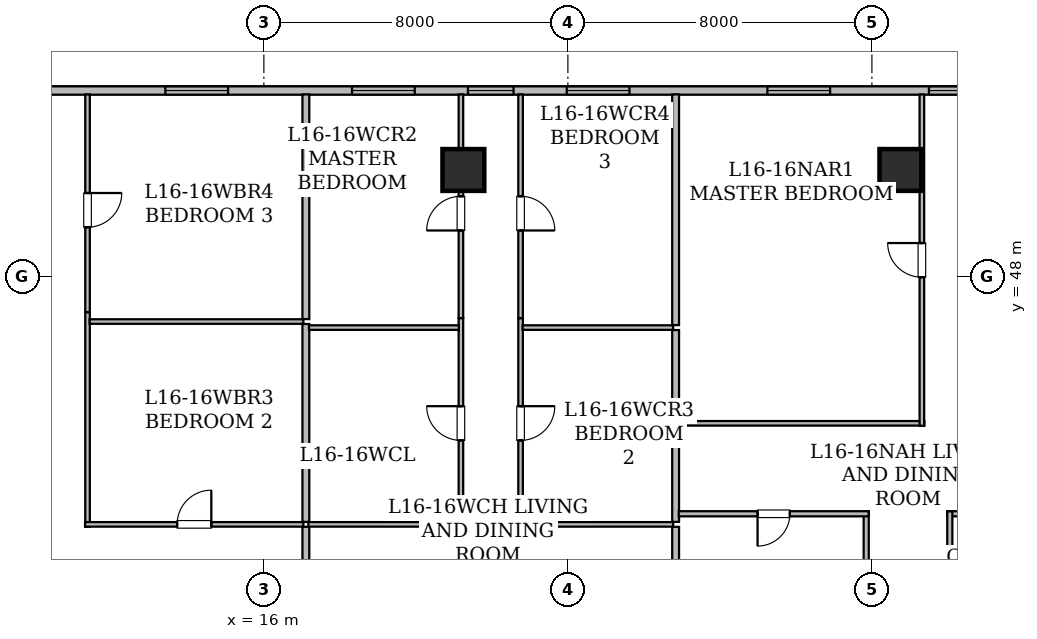
"""IFC4 building model, lengths in metres.
Left out: names, types, materials, properties, quantities, classifications, styles, units other than length and angle.
Written with IfcOpenShell. Run it as: python <this file> out.ifc"""

import sys

from ifc_helpers import new_model, si_unit, direction, frame, frame_2d, origin, origin_2d, place, context, subcontext, project, spatial, rectangle, hollow_rectangle, extrude, element, fill, save


model = new_model("IFC4")
c1 = context("Model", 3, precision=1e-05, world=origin(), true_north=direction((0.0, 1.0)))
c2 = subcontext(c1, "Body", "Model", "MODEL_VIEW")
j1 = project(units=[si_unit("LENGTHUNIT", "METRE"), si_unit("PLANEANGLEUNIT", "RADIAN")], contexts=[c1])
p1 = place(None, origin())
s1 = spatial("IfcSite", under=j1, at=p1, CompositionType="ELEMENT")
p2 = place(p1, origin())
s2 = spatial("IfcBuilding", under=s1, at=p2, CompositionType="ELEMENT")
p3 = place(p2, frame((0.0, 0.0, 66.15)))
s3 = spatial("IfcBuildingStorey", under=s2, at=p3, CompositionType="ELEMENT", Elevation=66.15)
for number, where, z_axis, x_axis in (
    (1, (21.25, 50.8, 0.0), (0.0, 0.0, 1.0), (1.0, 0.0, 0.0)),
    (2, (32.75, 50.8, 0.0), (0.0, 0.0, 1.0), (1.0, 0.0, 0.0)),
):
    element("IfcColumn", number, at=place(p3, frame(where, z_axis=z_axis, x_axis=x_axis)), inside=s3, PredefinedType="COLUMN", context=c2, shape_type="SweptSolid", body=[
        extrude(hollow_rectangle(XDim=1.1, YDim=1.1, WallThickness=0.055, at=origin_2d()), origin(), (0.0, 0.0, 1.0), 3.65),
    ])
p4 = place(p3, frame((8.315, 52.89, 0.0), z_axis=(0.0, 0.0, 1.0), x_axis=(1.0, 0.0, 0.0)))
e3 = element("IfcWall", 3, at=p4, inside=s3, PredefinedType="STANDARD", context=c2, shape_type="SweptSolid", body=[
    extrude(rectangle(XDim=37.439, YDim=0.22, at=frame_2d((18.719, 0.0))), origin(), (0.0, 0.0, 1.0), 3.43),
])
p5 = place(p4, frame((5.093, 0.0, 0.85)))
e4 = element("IfcOpeningElement", 4, at=p5, cuts=e3, PredefinedType="OPENING", context=c2, shape_type="SweptSolid", body=[
    extrude(rectangle(XDim=1.65, YDim=1.55, at=frame_2d((0.825, 0.775))), frame((0.0, 0.12, 0.0), z_axis=(0.0, -1.0, 0.0), x_axis=(1.0, 0.0, 0.0)), (0.0, 0.0, 1.0), 0.24),
])
p6 = place(p4, frame((13.055, 0.0, 0.8)))
e5 = element("IfcOpeningElement", 5, at=p6, cuts=e3, PredefinedType="OPENING", context=c2, shape_type="SweptSolid", body=[
    extrude(rectangle(XDim=1.2, YDim=1.5, at=frame_2d((0.6, 0.75))), frame((0.0, 0.12, 0.0), z_axis=(0.0, -1.0, 0.0), x_axis=(1.0, 0.0, 0.0)), (0.0, 0.0, 1.0), 0.24),
])
p7 = place(p4, frame((10.005, 0.0, 0.85)))
e6 = element("IfcOpeningElement", 6, at=p7, cuts=e3, PredefinedType="OPENING", context=c2, shape_type="SweptSolid", body=[
    extrude(rectangle(XDim=1.65, YDim=1.55, at=frame_2d((0.825, 0.775))), frame((0.0, 0.12, 0.0), z_axis=(0.0, -1.0, 0.0), x_axis=(1.0, 0.0, 0.0)), (0.0, 0.0, 1.0), 0.24),
])
p8 = place(p4, frame((15.655, 0.0, 0.85)))
e7 = element("IfcOpeningElement", 7, at=p8, cuts=e3, PredefinedType="OPENING", context=c2, shape_type="SweptSolid", body=[
    extrude(rectangle(XDim=1.65, YDim=1.55, at=frame_2d((0.825, 0.775))), frame((0.0, 0.12, 0.0), z_axis=(0.0, -1.0, 0.0), x_axis=(1.0, 0.0, 0.0)), (0.0, 0.0, 1.0), 0.24),
])
p9 = place(p4, frame((25.185, 0.0, 0.8)))
e8 = element("IfcOpeningElement", 8, at=p9, cuts=e3, PredefinedType="OPENING", context=c2, shape_type="SweptSolid", body=[
    extrude(rectangle(XDim=1.2, YDim=1.5, at=frame_2d((0.6, 0.75))), frame((0.0, 0.12, 0.0), z_axis=(0.0, -1.0, 0.0), x_axis=(1.0, 0.0, 0.0)), (0.0, 0.0, 1.0), 0.24),
])
p10 = place(p4, frame((20.935, 0.0, 0.85)))
e9 = element("IfcOpeningElement", 9, at=p10, cuts=e3, PredefinedType="OPENING", context=c2, shape_type="SweptSolid", body=[
    extrude(rectangle(XDim=1.65, YDim=1.55, at=frame_2d((0.825, 0.775))), frame((0.0, 0.12, 0.0), z_axis=(0.0, -1.0, 0.0), x_axis=(1.0, 0.0, 0.0)), (0.0, 0.0, 1.0), 0.24),
])
p11 = place(p4, frame((28.985, 0.0, 0.85)))
e10 = element("IfcOpeningElement", 10, at=p11, cuts=e3, PredefinedType="OPENING", context=c2, shape_type="SweptSolid", body=[
    extrude(rectangle(XDim=1.65, YDim=1.55, at=frame_2d((0.825, 0.775))), frame((0.0, 0.12, 0.0), z_axis=(0.0, -1.0, 0.0), x_axis=(1.0, 0.0, 0.0)), (0.0, 0.0, 1.0), 0.24),
])
p12 = place(p4, frame((33.49, 0.0, 0.85)))
e11 = element("IfcOpeningElement", 11, at=p12, cuts=e3, PredefinedType="OPENING", context=c2, shape_type="SweptSolid", body=[
    extrude(rectangle(XDim=1.65, YDim=1.55, at=frame_2d((0.825, 0.775))), frame((0.0, 0.12, 0.0), z_axis=(0.0, -1.0, 0.0), x_axis=(1.0, 0.0, 0.0)), (0.0, 0.0, 1.0), 0.24),
])
p13 = place(p4, frame((35.942, 0.0, 0.85)))
e12 = element("IfcOpeningElement", 12, at=p13, cuts=e3, PredefinedType="OPENING", context=c2, shape_type="SweptSolid", body=[
    extrude(rectangle(XDim=1.35, YDim=1.5, at=frame_2d((0.675, 0.75))), frame((0.0, 0.12, 0.0), z_axis=(0.0, -1.0, 0.0), x_axis=(1.0, 0.0, 0.0)), (0.0, 0.0, 1.0), 0.24),
])
p14 = place(p3, frame((11.36, 47.061, 0.0), z_axis=(0.0, 0.0, 1.0), x_axis=(0.0, -1.0, 0.0)))
e13 = element("IfcWall", 13, at=p14, inside=s3, PredefinedType="PARTITIONING", context=c2, shape_type="SweptSolid", body=[
    extrude(rectangle(XDim=5.651, YDim=0.12, at=frame_2d((2.826, 0.0))), origin(), (0.0, 0.0, 1.0), 3.065),
])
p15 = place(p3, frame((11.295, 41.475, 0.0), z_axis=(0.0, 0.0, 1.0), x_axis=(1.0, 0.0, 0.0)))
e14 = element("IfcWall", 14, at=p15, inside=s3, PredefinedType="PARTITIONING", context=c2, shape_type="SweptSolid", body=[
    extrude(rectangle(XDim=5.745, YDim=0.12, at=frame_2d((2.873, 0.0))), origin(), (0.0, 0.0, 1.0), 2.647),
])
p16 = place(p15, frame((2.422, 0.0, 0.0)))
e15 = element("IfcOpeningElement", 15, at=p16, cuts=e14, PredefinedType="OPENING", context=c2, shape_type="SweptSolid", body=[
    extrude(rectangle(XDim=0.9, YDim=2.1, at=frame_2d((0.45, 1.05))), frame((0.0, 0.07, 0.0), z_axis=(0.0, -1.0, 0.0), x_axis=(1.0, 0.0, 0.0)), (0.0, 0.0, 1.0), 0.14),
])
p17 = place(p3, frame((11.36, 52.788, 0.0), z_axis=(0.0, 0.0, 1.0), x_axis=(0.0, -1.0, 0.0)))
e16 = element("IfcWall", 16, at=p17, inside=s3, PredefinedType="PARTITIONING", context=c2, shape_type="SweptSolid", body=[
    extrude(rectangle(XDim=5.727, YDim=0.12, at=frame_2d((2.864, 0.0))), origin(), (0.0, 0.0, 1.0), 2.647),
])
p18 = place(p17, frame((2.594, 0.0, 0.0)))
e17 = element("IfcOpeningElement", 17, at=p18, cuts=e16, PredefinedType="OPENING", context=c2, shape_type="SweptSolid", body=[
    extrude(rectangle(XDim=0.9, YDim=2.1, at=frame_2d((0.45, 1.05))), frame((0.0, 0.07, 0.0), z_axis=(0.0, -1.0, 0.0), x_axis=(1.0, 0.0, 0.0)), (0.0, 0.0, 1.0), 0.14),
])
p19 = place(p3, frame((17.105, 41.41, 0.0), z_axis=(0.0, 0.0, 1.0), x_axis=(0.0, -1.0, 0.0)))
e18 = element("IfcWall", 18, at=p19, inside=s3, PredefinedType="STANDARD", context=c2, shape_type="SweptSolid", body=[
    extrude(rectangle(XDim=2.25, YDim=0.18, at=frame_2d((1.125, 0.0))), origin(), (0.0, 0.0, 1.0), 2.647),
])
p20 = place(p3, frame((11.414, 46.812, 0.0), z_axis=(0.0, 0.0, 1.0), x_axis=(1.0, 0.0, 0.0)))
e19 = element("IfcWall", 19, at=p20, inside=s3, PredefinedType="PARTITIONING", context=c2, shape_type="SweptSolid", body=[
    extrude(rectangle(XDim=5.626, YDim=0.12, at=frame_2d((2.813, 0.0))), origin(), (0.0, 0.0, 1.0), 2.647),
])
p21 = place(p3, frame((17.105, 46.747, 0.0), z_axis=(0.0, 0.0, 1.0), x_axis=(0.0, -1.0, 0.0)))
e20 = element("IfcWall", 20, at=p21, inside=s3, PredefinedType="STANDARD", context=c2, shape_type="SweptSolid", body=[
    extrude(rectangle(XDim=5.207, YDim=0.18, at=frame_2d((2.604, 0.0))), origin(), (0.0, 0.0, 1.0), 3.065),
])
p22 = place(p3, frame((17.105, 52.788, 0.0), z_axis=(0.0, 0.0, 1.0), x_axis=(0.0, -1.0, 0.0)))
e21 = element("IfcWall", 21, at=p22, inside=s3, PredefinedType="STANDARD", context=c2, shape_type="SweptSolid", body=[
    extrude(rectangle(XDim=5.911, YDim=0.18, at=frame_2d((2.956, 0.0))), origin(), (0.0, 0.0, 1.0), 2.803),
])
p23 = place(p3, frame((17.17, 41.475, 0.0), z_axis=(0.0, 0.0, 1.0), x_axis=(1.0, 0.0, 0.0)))
e22 = element("IfcWall", 22, at=p23, inside=s3, PredefinedType="PARTITIONING", context=c2, shape_type="SweptSolid", body=[
    extrude(rectangle(XDim=4.08, YDim=0.12, at=frame_2d((2.04, 0.0))), origin(), (0.0, 0.0, 1.0), 2.647),
])
p24 = place(p3, frame((21.185, 41.41, 0.0), z_axis=(0.0, 0.0, 1.0), x_axis=(0.0, 1.0, 0.0)))
e23 = element("IfcWall", 23, at=p24, inside=s3, PredefinedType="PARTITIONING", context=c2, shape_type="SweptSolid", body=[
    extrude(rectangle(XDim=5.492, YDim=0.12, at=frame_2d((2.746, 0.0))), origin(), (0.0, 0.0, 1.0), 3.065),
])
p25 = place(p24, frame((2.275, 0.0, 0.0)))
e24 = element("IfcOpeningElement", 24, at=p25, cuts=e23, PredefinedType="OPENING", context=c2, shape_type="SweptSolid", body=[
    extrude(rectangle(XDim=0.9, YDim=2.1, at=frame_2d((0.45, 1.05))), frame((0.0, 0.07, 0.0), z_axis=(0.0, -1.0, 0.0), x_axis=(1.0, 0.0, 0.0)), (0.0, 0.0, 1.0), 0.14),
])
p26 = place(p3, frame((21.185, 46.902, 0.0), z_axis=(0.0, 0.0, 1.0), x_axis=(0.0, 1.0, 0.0)))
e25 = element("IfcWall", 25, at=p26, inside=s3, PredefinedType="PARTITIONING", context=c2, shape_type="SweptSolid", body=[
    extrude(rectangle(XDim=5.886, YDim=0.12, at=frame_2d((2.943, 0.0))), origin(), (0.0, 0.0, 1.0), 2.647),
])
p27 = place(p26, frame((2.306, 0.0, 0.0)))
e26 = element("IfcOpeningElement", 26, at=p27, cuts=e25, PredefinedType="OPENING", context=c2, shape_type="SweptSolid", body=[
    extrude(rectangle(XDim=0.9, YDim=2.1, at=frame_2d((0.45, 1.05))), frame((0.0, 0.07, 0.0), z_axis=(0.0, -1.0, 0.0), x_axis=(1.0, 0.0, 0.0)), (0.0, 0.0, 1.0), 0.14),
])
p28 = place(p3, frame((22.755, 46.902, 0.0), z_axis=(0.0, 0.0, 1.0), x_axis=(0.0, -1.0, 0.0)))
e27 = element("IfcWall", 27, at=p28, inside=s3, PredefinedType="PARTITIONING", context=c2, shape_type="SweptSolid", body=[
    extrude(rectangle(XDim=5.492, YDim=0.12, at=frame_2d((2.746, 0.0))), origin(), (0.0, 0.0, 1.0), 3.065),
])
p29 = place(p28, frame((2.317, 0.0, 0.0)))
e28 = element("IfcOpeningElement", 28, at=p29, cuts=e27, PredefinedType="OPENING", context=c2, shape_type="SweptSolid", body=[
    extrude(rectangle(XDim=0.9, YDim=2.1, at=frame_2d((0.45, 1.05))), frame((0.0, 0.07, 0.0), z_axis=(0.0, -1.0, 0.0), x_axis=(1.0, 0.0, 0.0)), (0.0, 0.0, 1.0), 0.14),
])
p30 = place(p3, frame((22.69, 41.475, 0.0), z_axis=(0.0, 0.0, 1.0), x_axis=(1.0, 0.0, 0.0)))
e29 = element("IfcWall", 29, at=p30, inside=s3, PredefinedType="PARTITIONING", context=c2, shape_type="SweptSolid", body=[
    extrude(rectangle(XDim=4.08, YDim=0.12, at=frame_2d((2.04, 0.0))), origin(), (0.0, 0.0, 1.0), 3.43),
])
p31 = place(p3, frame((22.755, 52.788, 0.0), z_axis=(0.0, 0.0, 1.0), x_axis=(0.0, -1.0, 0.0)))
e30 = element("IfcWall", 30, at=p31, inside=s3, PredefinedType="PARTITIONING", context=c2, shape_type="SweptSolid", body=[
    extrude(rectangle(XDim=5.886, YDim=0.12, at=frame_2d((2.943, 0.0))), origin(), (0.0, 0.0, 1.0), 2.803),
])
p32 = place(p31, frame((2.68, 0.0, 0.0)))
e31 = element("IfcOpeningElement", 31, at=p32, cuts=e30, PredefinedType="OPENING", context=c2, shape_type="SweptSolid", body=[
    extrude(rectangle(XDim=0.9, YDim=2.1, at=frame_2d((0.45, 1.05))), frame((0.0, 0.07, 0.0), z_axis=(0.0, -1.0, 0.0), x_axis=(1.0, 0.0, 0.0)), (0.0, 0.0, 1.0), 0.14),
])
p33 = place(p3, frame((26.835, 41.41, 0.0), z_axis=(0.0, 0.0, 1.0), x_axis=(0.0, -1.0, 0.0)))
e32 = element("IfcWall", 32, at=p33, inside=s3, PredefinedType="STANDARD", context=c2, shape_type="SweptSolid", body=[
    extrude(rectangle(XDim=2.18, YDim=0.18, at=frame_2d((1.09, 0.0))), origin(), (0.0, 0.0, 1.0), 3.43),
])
p34 = place(p3, frame((17.187, 46.653, 0.0), z_axis=(0.0, 0.0, 1.0), x_axis=(1.0, 0.0, 0.0)))
e33 = element("IfcWall", 33, at=p34, inside=s3, PredefinedType="PARTITIONING", context=c2, shape_type="SweptSolid", body=[
    extrude(rectangle(XDim=3.944, YDim=0.12, at=frame_2d((1.972, 0.0))), origin(), (0.0, 0.0, 1.0), 2.647),
])
p35 = place(p3, frame((22.809, 46.653, 0.0), z_axis=(0.0, 0.0, 1.0), x_axis=(1.0, 0.0, 0.0)))
e34 = element("IfcWall", 34, at=p35, inside=s3, PredefinedType="PARTITIONING", context=c2, shape_type="SweptSolid", body=[
    extrude(rectangle(XDim=3.961, YDim=0.12, at=frame_2d((1.98, 0.0))), origin(), (0.0, 0.0, 1.0), 3.43),
])
p36 = place(p3, frame((26.835, 44.383, 0.0), z_axis=(0.0, 0.0, 1.0), x_axis=(0.0, -1.0, 0.0)))
e35 = element("IfcWall", 35, at=p36, inside=s3, PredefinedType="STANDARD", context=c2, shape_type="SweptSolid", body=[
    extrude(rectangle(XDim=2.843, YDim=0.18, at=frame_2d((1.421, 0.0))), origin(), (0.0, 0.0, 1.0), 3.065),
])
p37 = place(p3, frame((26.835, 46.588, 0.0), z_axis=(0.0, 0.0, 1.0), x_axis=(0.0, -1.0, 0.0)))
e36 = element("IfcWall", 36, at=p37, inside=s3, PredefinedType="STANDARD", context=c2, shape_type="SweptSolid", body=[
    extrude(rectangle(XDim=2.205, YDim=0.18, at=frame_2d((1.103, 0.0))), origin(), (0.0, 0.0, 1.0), 3.43),
])
p38 = place(p3, frame((26.835, 52.788, 0.0), z_axis=(0.0, 0.0, 1.0), x_axis=(0.0, -1.0, 0.0)))
e37 = element("IfcWall", 37, at=p38, inside=s3, PredefinedType="STANDARD", context=c2, shape_type="SweptSolid", body=[
    extrude(rectangle(XDim=6.07, YDim=0.18, at=frame_2d((3.035, 0.0))), origin(), (0.0, 0.0, 1.0), 2.803),
])
p39 = place(p3, frame((31.85, 39.232, 0.0), z_axis=(0.0, 0.0, 1.0), x_axis=(0.0, 1.0, 0.0)))
e38 = element("IfcWall", 38, at=p39, inside=s3, PredefinedType="PARTITIONING", context=c2, shape_type="SweptSolid", body=[
    extrude(rectangle(XDim=2.587, YDim=0.135, at=frame_2d((1.293, 0.0))), origin(), (0.0, 0.0, 1.0), 3.43),
])
p40 = place(p3, frame((31.915, 41.754, 0.0), z_axis=(0.0, 0.0, 1.0), x_axis=(-1.0, 0.0, 0.0)))
e39 = element("IfcWall", 39, at=p40, inside=s3, PredefinedType="PARTITIONING", context=c2, shape_type="SweptSolid", body=[
    extrude(rectangle(XDim=4.998, YDim=0.135, at=frame_2d((2.499, 0.0))), origin(), (0.0, 0.0, 1.0), 2.647),
])
p41 = place(p40, frame((2.074, 0.0, 0.0)))
e40 = element("IfcOpeningElement", 40, at=p41, cuts=e39, PredefinedType="OPENING", context=c2, shape_type="SweptSolid", body=[
    extrude(rectangle(XDim=0.85, YDim=2.1, at=frame_2d((0.425, 1.05))), frame((0.0, 0.077, 0.0), z_axis=(0.0, -1.0, 0.0), x_axis=(1.0, 0.0, 0.0)), (0.0, 0.0, 1.0), 0.155),
])
p42 = place(p3, frame((41.3, 41.754, 0.0), z_axis=(0.0, 0.0, 1.0), x_axis=(-1.0, 0.0, 0.0)))
e41 = element("IfcWall", 41, at=p42, inside=s3, PredefinedType="PARTITIONING", context=c2, shape_type="SweptSolid", body=[
    extrude(rectangle(XDim=7.315, YDim=0.135, at=frame_2d((3.657, 0.0))), origin(), (0.0, 0.0, 1.0), 3.43),
])
p43 = place(p42, frame((3.233, 0.0, 0.0)))
e42 = element("IfcOpeningElement", 42, at=p43, cuts=e41, PredefinedType="OPENING", context=c2, shape_type="SweptSolid", body=[
    extrude(rectangle(XDim=0.85, YDim=2.1, at=frame_2d((0.425, 1.05))), frame((0.0, 0.077, 0.0), z_axis=(0.0, -1.0, 0.0), x_axis=(1.0, 0.0, 0.0)), (0.0, 0.0, 1.0), 0.155),
])
p44 = place(p3, frame((34.05, 41.819, 0.0), z_axis=(0.0, 0.0, 1.0), x_axis=(0.0, -1.0, 0.0)))
e43 = element("IfcWall", 43, at=p44, inside=s3, PredefinedType="PARTITIONING", context=c2, shape_type="SweptSolid", body=[
    extrude(rectangle(XDim=2.587, YDim=0.135, at=frame_2d((1.293, 0.0))), origin(), (0.0, 0.0, 1.0), 3.43),
])
p45 = place(p3, frame((26.917, 44.134, 0.0), z_axis=(0.0, 0.0, 1.0), x_axis=(1.0, 0.0, 0.0)))
e44 = element("IfcWall", 44, at=p45, inside=s3, PredefinedType="PARTITIONING", context=c2, shape_type="SweptSolid", body=[
    extrude(rectangle(XDim=6.463, YDim=0.12, at=frame_2d((3.231, 0.0))), origin(), (0.0, 0.0, 1.0), 2.647),
])
p46 = place(p3, frame((33.315, 44.069, 0.0), z_axis=(0.0, 0.0, 1.0), x_axis=(0.0, 1.0, 0.0)))
e45 = element("IfcWall", 45, at=p46, inside=s3, PredefinedType="PARTITIONING", context=c2, shape_type="SweptSolid", body=[
    extrude(rectangle(XDim=8.719, YDim=0.12, at=frame_2d((4.359, 0.0))), origin(), (0.0, 0.0, 1.0), 2.803),
])
p47 = place(p46, frame((3.909, 0.0, 0.0)))
e46 = element("IfcOpeningElement", 46, at=p47, cuts=e45, PredefinedType="OPENING", context=c2, shape_type="SweptSolid", body=[
    extrude(rectangle(XDim=0.9, YDim=2.1, at=frame_2d((0.45, 1.05))), frame((0.0, 0.07, 0.0), z_axis=(0.0, -1.0, 0.0), x_axis=(1.0, 0.0, 0.0)), (0.0, 0.0, 1.0), 0.14),
])
p48 = place(p5, origin())
e47 = element("IfcWindow", 47, at=p48, inside=s3, PartitioningType="SINGLE_PANEL", PredefinedType="WINDOW", context=c2, shape_type="SweptSolid", body=[
    extrude(rectangle(XDim=1.65, YDim=1.55, at=frame_2d((0.825, 0.775))), frame((0.0, 0.03, 0.0), z_axis=(0.0, -1.0, 0.0), x_axis=(1.0, 0.0, 0.0)), (0.0, 0.0, 1.0), 0.06),
])
fill(e4, e47)
p49 = place(p6, origin())
e48 = element("IfcWindow", 48, at=p49, inside=s3, PartitioningType="SINGLE_PANEL", PredefinedType="WINDOW", context=c2, shape_type="SweptSolid", body=[
    extrude(rectangle(XDim=1.2, YDim=1.5, at=frame_2d((0.6, 0.75))), frame((0.0, 0.03, 0.0), z_axis=(0.0, -1.0, 0.0), x_axis=(1.0, 0.0, 0.0)), (0.0, 0.0, 1.0), 0.06),
])
fill(e5, e48)
p50 = place(p7, origin())
e49 = element("IfcWindow", 49, at=p50, inside=s3, PartitioningType="SINGLE_PANEL", PredefinedType="WINDOW", context=c2, shape_type="SweptSolid", body=[
    extrude(rectangle(XDim=1.65, YDim=1.55, at=frame_2d((0.825, 0.775))), frame((0.0, 0.03, 0.0), z_axis=(0.0, -1.0, 0.0), x_axis=(1.0, 0.0, 0.0)), (0.0, 0.0, 1.0), 0.06),
])
fill(e6, e49)
p51 = place(p8, origin())
e50 = element("IfcWindow", 50, at=p51, inside=s3, PartitioningType="SINGLE_PANEL", PredefinedType="WINDOW", context=c2, shape_type="SweptSolid", body=[
    extrude(rectangle(XDim=1.65, YDim=1.55, at=frame_2d((0.825, 0.775))), frame((0.0, 0.03, 0.0), z_axis=(0.0, -1.0, 0.0), x_axis=(1.0, 0.0, 0.0)), (0.0, 0.0, 1.0), 0.06),
])
fill(e7, e50)
p52 = place(p9, origin())
e51 = element("IfcWindow", 51, at=p52, inside=s3, PartitioningType="SINGLE_PANEL", PredefinedType="WINDOW", context=c2, shape_type="SweptSolid", body=[
    extrude(rectangle(XDim=1.2, YDim=1.5, at=frame_2d((0.6, 0.75))), frame((0.0, 0.03, 0.0), z_axis=(0.0, -1.0, 0.0), x_axis=(1.0, 0.0, 0.0)), (0.0, 0.0, 1.0), 0.06),
])
fill(e8, e51)
p53 = place(p10, origin())
e52 = element("IfcWindow", 52, at=p53, inside=s3, PartitioningType="SINGLE_PANEL", PredefinedType="WINDOW", context=c2, shape_type="SweptSolid", body=[
    extrude(rectangle(XDim=1.65, YDim=1.55, at=frame_2d((0.825, 0.775))), frame((0.0, 0.03, 0.0), z_axis=(0.0, -1.0, 0.0), x_axis=(1.0, 0.0, 0.0)), (0.0, 0.0, 1.0), 0.06),
])
fill(e9, e52)
p54 = place(p16, origin())
e53 = element("IfcDoor", 53, at=p54, inside=s3, OperationType="SINGLE_SWING_RIGHT", PredefinedType="DOOR", context=c2, shape_type="SweptSolid", body=[
    extrude(rectangle(XDim=0.9, YDim=2.1, at=frame_2d((0.45, 1.05))), frame((0.0, 0.025, 0.0), z_axis=(0.0, -1.0, 0.0), x_axis=(1.0, 0.0, 0.0)), (0.0, 0.0, 1.0), 0.05),
])
fill(e15, e53)
p55 = place(p18, origin())
e54 = element("IfcDoor", 54, at=p55, inside=s3, OperationType="SINGLE_SWING_LEFT", PredefinedType="DOOR", context=c2, shape_type="SweptSolid", body=[
    extrude(rectangle(XDim=0.9, YDim=2.1, at=frame_2d((0.45, 1.05))), frame((0.0, 0.025, 0.0), z_axis=(0.0, -1.0, 0.0), x_axis=(1.0, 0.0, 0.0)), (0.0, 0.0, 1.0), 0.05),
])
fill(e17, e54)
p56 = place(p25, origin())
e55 = element("IfcDoor", 55, at=p56, inside=s3, OperationType="SINGLE_SWING_RIGHT", PredefinedType="DOOR", context=c2, shape_type="SweptSolid", body=[
    extrude(rectangle(XDim=0.9, YDim=2.1, at=frame_2d((0.45, 1.05))), frame((0.0, 0.025, 0.0), z_axis=(0.0, -1.0, 0.0), x_axis=(1.0, 0.0, 0.0)), (0.0, 0.0, 1.0), 0.05),
])
fill(e24, e55)
p57 = place(p27, origin())
e56 = element("IfcDoor", 56, at=p57, inside=s3, OperationType="SINGLE_SWING_LEFT", PredefinedType="DOOR", context=c2, shape_type="SweptSolid", body=[
    extrude(rectangle(XDim=0.9, YDim=2.1, at=frame_2d((0.45, 1.05))), frame((0.0, 0.025, 0.0), z_axis=(0.0, -1.0, 0.0), x_axis=(1.0, 0.0, 0.0)), (0.0, 0.0, 1.0), 0.05),
])
fill(e26, e56)
p58 = place(p29, origin())
e57 = element("IfcDoor", 57, at=p58, inside=s3, OperationType="SINGLE_SWING_LEFT", PredefinedType="DOOR", context=c2, shape_type="SweptSolid", body=[
    extrude(rectangle(XDim=0.9, YDim=2.1, at=frame_2d((0.45, 1.05))), frame((0.0, 0.025, 0.0), z_axis=(0.0, -1.0, 0.0), x_axis=(1.0, 0.0, 0.0)), (0.0, 0.0, 1.0), 0.05),
])
fill(e28, e57)
p59 = place(p32, origin())
e58 = element("IfcDoor", 58, at=p59, inside=s3, OperationType="SINGLE_SWING_RIGHT", PredefinedType="DOOR", context=c2, shape_type="SweptSolid", body=[
    extrude(rectangle(XDim=0.9, YDim=2.1, at=frame_2d((0.45, 1.05))), frame((0.0, 0.025, 0.0), z_axis=(0.0, -1.0, 0.0), x_axis=(1.0, 0.0, 0.0)), (0.0, 0.0, 1.0), 0.05),
])
fill(e31, e58)
p60 = place(p41, origin())
e59 = element("IfcDoor", 59, at=p60, inside=s3, OperationType="SINGLE_SWING_RIGHT", PredefinedType="DOOR", context=c2, shape_type="SweptSolid", body=[
    extrude(rectangle(XDim=0.85, YDim=2.1, at=frame_2d((0.425, 1.05))), frame((0.0, 0.025, 0.0), z_axis=(0.0, -1.0, 0.0), x_axis=(1.0, 0.0, 0.0)), (0.0, 0.0, 1.0), 0.05),
])
fill(e40, e59)
p61 = place(p47, origin())
e60 = element("IfcDoor", 60, at=p61, inside=s3, OperationType="SINGLE_SWING_RIGHT", PredefinedType="DOOR", context=c2, shape_type="SweptSolid", body=[
    extrude(rectangle(XDim=0.9, YDim=2.1, at=frame_2d((0.45, 1.05))), frame((0.0, 0.025, 0.0), z_axis=(0.0, -1.0, 0.0), x_axis=(1.0, 0.0, 0.0)), (0.0, 0.0, 1.0), 0.05),
])
fill(e46, e60)
save(model, sys.argv[1])
